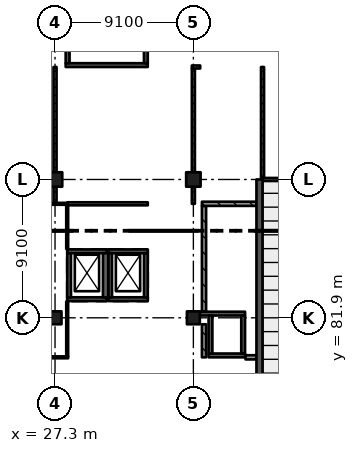
"""IFC4 building model, lengths in metres.
Left out: names, types, materials, properties, quantities, classifications, styles, units other than length and angle.
Written with IfcOpenShell. Run it as: python <this file> out.ifc"""

import sys

from ifc_helpers import new_model, si_unit, direction, frame, frame_2d, origin, origin_2d, place, context, subcontext, project, spatial, rectangle, extrude, element, fill, save


model = new_model("IFC4")
c1 = context("Model", 3, precision=1e-05, world=origin(), true_north=direction((0.0, 1.0)))
c2 = subcontext(c1, "Body", "Model", "MODEL_VIEW")
j1 = project(units=[si_unit("LENGTHUNIT", "METRE"), si_unit("PLANEANGLEUNIT", "RADIAN")], contexts=[c1])
p1 = place(None, origin())
s1 = spatial("IfcSite", under=j1, at=p1, CompositionType="ELEMENT")
p2 = place(p1, origin())
s2 = spatial("IfcBuilding", under=s1, at=p2, CompositionType="ELEMENT")
p3 = place(p2, origin())
s3 = spatial("IfcBuildingStorey", under=s2, at=p3, CompositionType="ELEMENT", Elevation=0.0)
p4 = place(p3, frame((27.3, 81.9, -0.4), z_axis=(0.0, 0.0, 1.0), x_axis=(1.0, 0.0, 0.0)))
e1 = element("IfcColumn", 1, at=p4, inside=s3, PredefinedType="COLUMN", context=c2, shape_type="SweptSolid", body=[
    extrude(rectangle(XDim=0.85, YDim=0.85, at=origin_2d()), origin(), (0.0, 0.0, 1.0), 6.77),
])
p5 = place(p3, frame((27.3, 91.0, -0.4), z_axis=(0.0, 0.0, 1.0), x_axis=(1.0, 0.0, 0.0)))
e2 = element("IfcColumn", 2, at=p5, inside=s3, PredefinedType="COLUMN", context=c2, shape_type="SweptSolid", body=[
    extrude(rectangle(XDim=0.95, YDim=0.95, at=origin_2d()), origin(), (0.0, 0.0, 1.0), 6.77),
])
p6 = place(p3, frame((36.4, 81.9, -0.4), z_axis=(0.0, 0.0, 1.0), x_axis=(1.0, 0.0, 0.0)))
e3 = element("IfcColumn", 3, at=p6, inside=s3, PredefinedType="COLUMN", context=c2, shape_type="SweptSolid", body=[
    extrude(rectangle(XDim=0.85, YDim=0.85, at=origin_2d()), origin(), (0.0, 0.0, 1.0), 6.77),
])
p7 = place(p3, frame((36.4, 91.0, -0.4), z_axis=(0.0, 0.0, 1.0), x_axis=(1.0, 0.0, 0.0)))
e4 = element("IfcColumn", 4, at=p7, inside=s3, PredefinedType="COLUMN", context=c2, shape_type="SweptSolid", body=[
    extrude(rectangle(XDim=0.95, YDim=0.95, at=origin_2d()), origin(), (0.0, 0.0, 1.0), 6.77),
])
p8 = place(p3, frame((40.75, 72.8, -0.4), z_axis=(0.0, 0.0, 1.0), x_axis=(0.0, 1.0, 0.0)))
e5 = element("IfcWall", 5, at=p8, inside=s3, PredefinedType="SHEAR", context=c2, shape_type="SweptSolid", body=[
    extrude(rectangle(XDim=18.2, YDim=0.4, at=frame_2d((9.1, 0.0))), origin(), (0.0, 0.0, 1.0), 6.77),
])
p9 = place(p3, frame((30.7, 83.125, -1.4), z_axis=(0.0, 0.0, 1.0), x_axis=(-1.0, 0.0, 0.0)))
e6 = element("IfcWall", 6, at=p9, inside=s3, PredefinedType="SHEAR", context=c2, shape_type="SweptSolid", body=[
    extrude(rectangle(XDim=2.6, YDim=0.25, at=frame_2d((1.3, 0.0))), origin(), (0.0, 0.0, 1.0), 7.77),
])
p10 = place(p3, frame((30.7, 86.275, -1.4), z_axis=(0.0, 0.0, 1.0), x_axis=(-1.0, 0.0, 0.0)))
e7 = element("IfcWall", 7, at=p10, inside=s3, PredefinedType="SHEAR", context=c2, shape_type="SweptSolid", body=[
    extrude(rectangle(XDim=2.6, YDim=0.25, at=frame_2d((1.3, 0.0))), origin(), (0.0, 0.0, 1.0), 7.77),
])
p11 = place(p10, frame((0.8, 0.0, 1.4)))
e8 = element("IfcOpeningElement", 8, at=p11, cuts=e7, PredefinedType="OPENING", context=c2, shape_type="SweptSolid", body=[
    extrude(rectangle(XDim=1.0, YDim=2.1, at=frame_2d((0.5, 1.05))), frame((0.0, 0.135, 0.0), z_axis=(0.0, -1.0, 0.0), x_axis=(1.0, 0.0, 0.0)), (0.0, 0.0, 1.0), 0.27),
])
p12 = place(p3, frame((28.225, 86.15, -1.4), z_axis=(0.0, 0.0, 1.0), x_axis=(0.0, -1.0, 0.0)))
e9 = element("IfcWall", 9, at=p12, inside=s3, PredefinedType="SHEAR", context=c2, shape_type="SweptSolid", body=[
    extrude(rectangle(XDim=2.9, YDim=0.25, at=frame_2d((1.45, 0.0))), origin(), (0.0, 0.0, 1.0), 7.77),
])
p13 = place(p3, frame((30.625, 86.15, -1.4), z_axis=(0.0, 0.0, 1.0), x_axis=(0.0, -1.0, 0.0)))
e10 = element("IfcWall", 10, at=p13, inside=s3, PredefinedType="SHEAR", context=c2, shape_type="SweptSolid", body=[
    extrude(rectangle(XDim=2.9, YDim=0.35, at=frame_2d((1.45, 0.0))), origin(), (0.0, 0.0, 1.0), 7.77),
])
p14 = place(p3, frame((33.4, 83.125, -1.4), z_axis=(0.0, 0.0, 1.0), x_axis=(-1.0, 0.0, 0.0)))
e11 = element("IfcWall", 11, at=p14, inside=s3, PredefinedType="SHEAR", context=c2, shape_type="SweptSolid", body=[
    extrude(rectangle(XDim=2.6, YDim=0.25, at=frame_2d((1.3, 0.0))), origin(), (0.0, 0.0, 1.0), 7.77),
])
p15 = place(p3, frame((33.4, 86.275, -1.4), z_axis=(0.0, 0.0, 1.0), x_axis=(-1.0, 0.0, 0.0)))
e12 = element("IfcWall", 12, at=p15, inside=s3, PredefinedType="SHEAR", context=c2, shape_type="SweptSolid", body=[
    extrude(rectangle(XDim=2.6, YDim=0.25, at=frame_2d((1.3, 0.0))), origin(), (0.0, 0.0, 1.0), 7.77),
])
p16 = place(p15, frame((0.8, 0.0, 1.4)))
e13 = element("IfcOpeningElement", 13, at=p16, cuts=e12, PredefinedType="OPENING", context=c2, shape_type="SweptSolid", body=[
    extrude(rectangle(XDim=1.0, YDim=2.1, at=frame_2d((0.5, 1.05))), frame((0.0, 0.135, 0.0), z_axis=(0.0, -1.0, 0.0), x_axis=(1.0, 0.0, 0.0)), (0.0, 0.0, 1.0), 0.27),
])
for number, where, z_axis, x_axis in (
    (14, (30.925, 86.15, -1.4), (0.0, 0.0, 1.0), (0.0, -1.0, 0.0)),
    (15, (33.275, 86.15, -1.4), (0.0, 0.0, 1.0), (0.0, -1.0, 0.0)),
):
    element("IfcWall", number, at=place(p3, frame(where, z_axis=z_axis, x_axis=x_axis)), inside=s3, PredefinedType="SHEAR", context=c2, shape_type="SweptSolid", body=[
        extrude(rectangle(XDim=2.9, YDim=0.25, at=frame_2d((1.45, 0.0))), origin(), (0.0, 0.0, 1.0), 7.77),
    ])
p17 = place(p3, frame((39.8, 79.425, -0.4), z_axis=(0.0, 0.0, 1.0), x_axis=(-1.0, 0.0, 0.0)))
e16 = element("IfcWall", 16, at=p17, inside=s3, PredefinedType="SHEAR", context=c2, shape_type="SweptSolid", body=[
    extrude(rectangle(XDim=2.4, YDim=0.25, at=frame_2d((1.2, 0.0))), origin(), (0.0, 0.0, 1.0), 6.77),
])
p18 = place(p17, frame((0.75, 0.0, 0.4)))
e17 = element("IfcOpeningElement", 17, at=p18, cuts=e16, PredefinedType="OPENING", context=c2, shape_type="SweptSolid", body=[
    extrude(rectangle(XDim=0.9, YDim=2.1, at=frame_2d((0.45, 1.05))), frame((0.0, 0.135, 0.0), z_axis=(0.0, -1.0, 0.0), x_axis=(1.0, 0.0, 0.0)), (0.0, 0.0, 1.0), 0.27),
])
p19 = place(p3, frame((39.8, 82.175, -0.4), z_axis=(0.0, 0.0, 1.0), x_axis=(-1.0, 0.0, 0.0)))
e18 = element("IfcWall", 18, at=p19, inside=s3, PredefinedType="SHEAR", context=c2, shape_type="SweptSolid", body=[
    extrude(rectangle(XDim=2.975, YDim=0.25, at=frame_2d((1.488, 0.0))), origin(), (0.0, 0.0, 1.0), 6.77),
])
for number, where, z_axis, x_axis in (
    (19, (37.525, 82.05, -0.4), (0.0, 0.0, 1.0), (0.0, -1.0, 0.0)),
    (20, (39.675, 82.05, -0.4), (0.0, 0.0, 1.0), (0.0, -1.0, 0.0)),
):
    element("IfcWall", number, at=place(p3, frame(where, z_axis=z_axis, x_axis=x_axis)), inside=s3, PredefinedType="SHEAR", context=c2, shape_type="SweptSolid", body=[
        extrude(rectangle(XDim=2.5, YDim=0.25, at=frame_2d((1.25, 0.0))), origin(), (0.0, 0.0, 1.0), 6.77),
    ])
p20 = place(p3, frame((33.4, 98.525, -0.4), z_axis=(0.0, 0.0, 1.0), x_axis=(-1.0, 0.0, 0.0)))
e21 = element("IfcWall", 21, at=p20, inside=s3, PredefinedType="SHEAR", context=c2, shape_type="SweptSolid", body=[
    extrude(rectangle(XDim=5.4, YDim=0.25, at=frame_2d((2.7, 0.0))), origin(), (0.0, 0.0, 1.0), 6.77),
])
p21 = place(p20, frame((1.5, 0.0, 0.4)))
e22 = element("IfcOpeningElement", 22, at=p21, cuts=e21, PredefinedType="OPENING", context=c2, shape_type="SweptSolid", body=[
    extrude(rectangle(XDim=2.4, YDim=2.1, at=frame_2d((1.2, 1.05))), frame((0.0, 0.135, 0.0), z_axis=(0.0, -1.0, 0.0), x_axis=(1.0, 0.0, 0.0)), (0.0, 0.0, 1.0), 0.27),
])
p22 = place(p3, frame((28.125, 108.25, -0.4), z_axis=(0.0, 0.0, 1.0), x_axis=(0.0, -1.0, 0.0)))
e23 = element("IfcWall", 23, at=p22, inside=s3, PredefinedType="SHEAR", context=c2, shape_type="SweptSolid", body=[
    extrude(rectangle(XDim=9.6, YDim=0.25, at=frame_2d((4.8, 0.0))), origin(), (0.0, 0.0, 1.0), 6.77),
])
p23 = place(p3, frame((33.275, 108.25, -0.4), z_axis=(0.0, 0.0, 1.0), x_axis=(0.0, -1.0, 0.0)))
e24 = element("IfcWall", 24, at=p23, inside=s3, PredefinedType="SHEAR", context=c2, shape_type="SweptSolid", body=[
    extrude(rectangle(XDim=9.6, YDim=0.25, at=frame_2d((4.8, 0.0))), origin(), (0.0, 0.0, 1.0), 6.77),
])
p24 = place(p23, frame((7.95, 0.0, 0.4)))
e25 = element("IfcOpeningElement", 25, at=p24, cuts=e24, PredefinedType="OPENING", context=c2, shape_type="SweptSolid", body=[
    extrude(rectangle(XDim=1.2, YDim=2.1, at=frame_2d((0.6, 1.05))), frame((0.0, 0.135, 0.0), z_axis=(0.0, -1.0, 0.0), x_axis=(1.0, 0.0, 0.0)), (0.0, 0.0, 1.0), 0.27),
])
p25 = place(p3, frame((24.3, 89.4, 0.0), z_axis=(0.0, 0.0, 1.0), x_axis=(1.0, 0.0, 0.0)))
e26 = element("IfcWall", 26, at=p25, inside=s3, PredefinedType="PARTITIONING", context=c2, shape_type="SweptSolid", body=[
    extrude(rectangle(XDim=3.8, YDim=0.125, at=frame_2d((1.9, 0.0))), origin(), (0.0, 0.0, 1.0), 6.02),
])
p26 = place(p25, frame((1.05, 0.0, 0.0)))
e27 = element("IfcOpeningElement", 27, at=p26, cuts=e26, PredefinedType="OPENING", context=c2, shape_type="SweptSolid", body=[
    extrude(rectangle(XDim=0.9, YDim=2.1, at=frame_2d((0.45, 1.05))), frame((0.0, 0.073, 0.0), z_axis=(0.0, -1.0, 0.0), x_axis=(1.0, 0.0, 0.0)), (0.0, 0.0, 1.0), 0.145),
])
p27 = place(p3, frame((27.3, 90.525, 0.0), z_axis=(0.0, 0.0, 1.0), x_axis=(0.0, -1.0, 0.0)))
e28 = element("IfcWall", 28, at=p27, inside=s3, PredefinedType="PARTITIONING", context=c2, shape_type="SweptSolid", body=[
    extrude(rectangle(XDim=1.062, YDim=0.2, at=frame_2d((0.531, 0.0))), origin(), (0.0, 0.0, 1.0), 5.32),
])
p28 = place(p3, frame((27.3, 98.4, 0.0), z_axis=(0.0, 0.0, 1.0), x_axis=(0.0, -1.0, 0.0)))
e29 = element("IfcWall", 29, at=p28, inside=s3, PredefinedType="PARTITIONING", context=c2, shape_type="SweptSolid", body=[
    extrude(rectangle(XDim=6.925, YDim=0.2, at=frame_2d((3.462, 0.0))), origin(), (0.0, 0.0, 1.0), 5.32),
])
p29 = place(p28, frame((0.85, 0.0, 0.0)))
e30 = element("IfcOpeningElement", 30, at=p29, cuts=e29, PredefinedType="OPENING", context=c2, shape_type="SweptSolid", body=[
    extrude(rectangle(XDim=1.8, YDim=2.4, at=frame_2d((0.9, 1.2))), frame((0.0, 0.11, 0.0), z_axis=(0.0, -1.0, 0.0), x_axis=(1.0, 0.0, 0.0)), (0.0, 0.0, 1.0), 0.22),
])
p30 = place(p28, frame((4.25, 0.0, 0.0)))
e31 = element("IfcOpeningElement", 31, at=p30, cuts=e29, PredefinedType="OPENING", context=c2, shape_type="SweptSolid", body=[
    extrude(rectangle(XDim=1.8, YDim=2.4, at=frame_2d((0.9, 1.2))), frame((0.0, 0.11, 0.0), z_axis=(0.0, -1.0, 0.0), x_axis=(1.0, 0.0, 0.0)), (0.0, 0.0, 1.0), 0.22),
])
p31 = place(p3, frame((28.1, 82.97, 0.0), z_axis=(0.0, 0.0, 1.0), x_axis=(0.0, -1.0, 0.0)))
e32 = element("IfcWall", 32, at=p31, inside=s3, PredefinedType="PARTITIONING", context=c2, shape_type="SweptSolid", body=[
    extrude(rectangle(XDim=3.607, YDim=0.125, at=frame_2d((1.804, 0.0))), origin(), (0.0, 0.0, 1.0), 6.02),
])
p32 = place(p3, frame((28.1, 89.3, 0.0), z_axis=(0.0, 0.0, 1.0), x_axis=(0.0, -1.0, 0.0)))
e33 = element("IfcWall", 33, at=p32, inside=s3, PredefinedType="PARTITIONING", context=c2, shape_type="SweptSolid", body=[
    extrude(rectangle(XDim=2.87, YDim=0.125, at=frame_2d((1.435, 0.0))), origin(), (0.0, 0.0, 1.0), 6.02),
])
p33 = place(p3, frame((28.163, 79.3, 0.0), z_axis=(0.0, 0.0, 1.0), x_axis=(-1.0, 0.0, 0.0)))
e34 = element("IfcWall", 34, at=p33, inside=s3, PredefinedType="PARTITIONING", context=c2, shape_type="SweptSolid", body=[
    extrude(rectangle(XDim=1.433, YDim=0.125, at=frame_2d((0.716, 0.0))), origin(), (0.0, 0.0, 1.0), 6.02),
])
p34 = place(p3, frame((33.4, 89.4, 0.0), z_axis=(0.0, 0.0, 1.0), x_axis=(-1.0, 0.0, 0.0)))
e35 = element("IfcWall", 35, at=p34, inside=s3, PredefinedType="PARTITIONING", context=c2, shape_type="SweptSolid", body=[
    extrude(rectangle(XDim=5.3, YDim=0.2, at=frame_2d((2.65, 0.0))), origin(), (0.0, 0.0, 1.0), 6.02),
])
p35 = place(p34, frame((1.75, 0.0, 0.0)))
e36 = element("IfcOpeningElement", 36, at=p35, cuts=e35, PredefinedType="OPENING", context=c2, shape_type="SweptSolid", body=[
    extrude(rectangle(XDim=1.8, YDim=2.4, at=frame_2d((0.9, 1.2))), frame((0.0, 0.11, 0.0), z_axis=(0.0, -1.0, 0.0), x_axis=(1.0, 0.0, 0.0)), (0.0, 0.0, 1.0), 0.22),
])
p36 = place(p3, frame((36.4, 90.525, 0.0), z_axis=(0.0, 0.0, 1.0), x_axis=(0.0, -1.0, 0.0)))
e37 = element("IfcWall", 37, at=p36, inside=s3, PredefinedType="PARTITIONING", context=c2, shape_type="SweptSolid", body=[
    extrude(rectangle(XDim=1.125, YDim=0.2, at=frame_2d((0.562, 0.0))), origin(), (0.0, 0.0, 1.0), 5.32),
])
p37 = place(p3, frame((36.4, 98.3, 0.0), z_axis=(0.0, 0.0, 1.0), x_axis=(0.0, -1.0, 0.0)))
e38 = element("IfcWall", 38, at=p37, inside=s3, PredefinedType="PARTITIONING", context=c2, shape_type="SweptSolid", body=[
    extrude(rectangle(XDim=6.825, YDim=0.2, at=frame_2d((3.413, 0.0))), origin(), (0.0, 0.0, 1.0), 5.32),
])
p38 = place(p37, frame((0.85, 0.0, 0.0)))
e39 = element("IfcOpeningElement", 39, at=p38, cuts=e38, PredefinedType="OPENING", context=c2, shape_type="SweptSolid", body=[
    extrude(rectangle(XDim=1.8, YDim=2.4, at=frame_2d((0.9, 1.2))), frame((0.0, 0.11, 0.0), z_axis=(0.0, -1.0, 0.0), x_axis=(1.0, 0.0, 0.0)), (0.0, 0.0, 1.0), 0.22),
])
p39 = place(p37, frame((4.25, 0.0, 0.0)))
e40 = element("IfcOpeningElement", 40, at=p39, cuts=e38, PredefinedType="OPENING", context=c2, shape_type="SweptSolid", body=[
    extrude(rectangle(XDim=1.8, YDim=2.4, at=frame_2d((0.9, 1.2))), frame((0.0, 0.11, 0.0), z_axis=(0.0, -1.0, 0.0), x_axis=(1.0, 0.0, 0.0)), (0.0, 0.0, 1.0), 0.22),
])
p40 = place(p3, frame((36.85, 98.4, 0.0), z_axis=(0.0, 0.0, 1.0), x_axis=(-1.0, 0.0, 0.0)))
e41 = element("IfcWall", 41, at=p40, inside=s3, PredefinedType="PARTITIONING", context=c2, shape_type="SweptSolid", body=[
    extrude(rectangle(XDim=0.55, YDim=0.2, at=frame_2d((0.275, 0.0))), origin(), (0.0, 0.0, 1.0), 6.02),
])
p41 = place(p3, frame((37.1, 81.475, 0.0), z_axis=(0.0, 0.0, 1.0), x_axis=(0.0, -1.0, 0.0)))
e42 = element("IfcWall", 42, at=p41, inside=s3, PredefinedType="SOLIDWALL", context=c2, shape_type="SweptSolid", body=[
    extrude(rectangle(XDim=2.175, YDim=0.275, at=frame_2d((1.087, 0.0))), origin(), (0.0, 0.0, 1.0), 6.02),
])
p42 = place(p3, frame((37.1, 89.262, 0.0), z_axis=(0.0, 0.0, 1.0), x_axis=(0.0, -1.0, 0.0)))
e43 = element("IfcWall", 43, at=p42, inside=s3, PredefinedType="SOLIDWALL", context=c2, shape_type="SweptSolid", body=[
    extrude(rectangle(XDim=6.938, YDim=0.275, at=frame_2d((3.469, 0.0))), origin(), (0.0, 0.0, 1.0), 6.02),
])
p43 = place(p3, frame((40.55, 79.3, 0.0), z_axis=(0.0, 0.0, 1.0), x_axis=(-1.0, 0.0, 0.0)))
e44 = element("IfcWall", 44, at=p43, inside=s3, PredefinedType="SOLIDWALL", context=c2, shape_type="SweptSolid", body=[
    extrude(rectangle(XDim=0.72, YDim=0.275, at=frame_2d((0.36, 0.0))), origin(), (0.0, 0.0, 1.0), 6.02),
])
p44 = place(p3, frame((40.55, 89.4, 0.0), z_axis=(0.0, 0.0, 1.0), x_axis=(-1.0, 0.0, 0.0)))
e45 = element("IfcWall", 45, at=p44, inside=s3, PredefinedType="SOLIDWALL", context=c2, shape_type="SweptSolid", body=[
    extrude(rectangle(XDim=3.588, YDim=0.275, at=frame_2d((1.794, 0.0))), origin(), (0.0, 0.0, 1.0), 6.02),
])
p45 = place(p44, frame((1.15, 0.0, 0.0)))
e46 = element("IfcOpeningElement", 46, at=p45, cuts=e45, PredefinedType="OPENING", context=c2, shape_type="SweptSolid", body=[
    extrude(rectangle(XDim=1.2, YDim=2.4, at=frame_2d((0.6, 1.2))), frame((0.0, 0.147, 0.0), z_axis=(0.0, -1.0, 0.0), x_axis=(1.0, 0.0, 0.0)), (0.0, 0.0, 1.0), 0.295),
])
p46 = place(p3, frame((40.95, 98.4, 0.0), z_axis=(0.0, 0.0, 1.0), x_axis=(0.0, -1.0, 0.0)))
e47 = element("IfcWall", 47, at=p46, inside=s3, PredefinedType="PARTITIONING", context=c2, shape_type="SweptSolid", body=[
    extrude(rectangle(XDim=7.3, YDim=0.2, at=frame_2d((3.65, 0.0))), origin(), (0.0, 0.0, 1.0), 6.02),
])
p47 = place(p46, frame((0.95, 0.0, 0.0)))
e48 = element("IfcOpeningElement", 48, at=p47, cuts=e47, PredefinedType="OPENING", context=c2, shape_type="SweptSolid", body=[
    extrude(rectangle(XDim=1.8, YDim=2.4, at=frame_2d((0.9, 1.2))), frame((0.0, 0.11, 0.0), z_axis=(0.0, -1.0, 0.0), x_axis=(1.0, 0.0, 0.0)), (0.0, 0.0, 1.0), 0.22),
])
p48 = place(p46, frame((4.55, 0.0, 0.0)))
e49 = element("IfcOpeningElement", 49, at=p48, cuts=e47, PredefinedType="OPENING", context=c2, shape_type="SweptSolid", body=[
    extrude(rectangle(XDim=1.8, YDim=2.4, at=frame_2d((0.9, 1.2))), frame((0.0, 0.11, 0.0), z_axis=(0.0, -1.0, 0.0), x_axis=(1.0, 0.0, 0.0)), (0.0, 0.0, 1.0), 0.22),
])
p49 = place(p3, frame((45.2, 91.0, 0.0), z_axis=(0.0, 0.0, 1.0), x_axis=(-1.0, 0.0, 0.0)))
e50 = element("IfcWall", 50, at=p49, inside=s3, PredefinedType="PARTITIONING", context=c2, shape_type="SweptSolid", body=[
    extrude(rectangle(XDim=4.35, YDim=0.2, at=frame_2d((2.175, 0.0))), origin(), (0.0, 0.0, 1.0), 5.02),
])
p50 = place(p45, origin())
e51 = element("IfcDoor", 51, at=p50, inside=s3, OperationType="SINGLE_SWING_RIGHT", PredefinedType="DOOR", context=c2, shape_type="SweptSolid", body=[
    extrude(rectangle(XDim=1.2, YDim=2.4, at=frame_2d((0.6, 1.2))), frame((0.0, 0.025, 0.0), z_axis=(0.0, -1.0, 0.0), x_axis=(1.0, 0.0, 0.0)), (0.0, 0.0, 1.0), 0.05),
])
fill(e46, e51)
p51 = place(p29, origin())
e52 = element("IfcDoor", 52, at=p51, inside=s3, OperationType="DOUBLE_DOOR_SINGLE_SWING", PredefinedType="DOOR", context=c2, shape_type="SweptSolid", body=[
    extrude(rectangle(XDim=1.8, YDim=2.4, at=frame_2d((0.9, 1.2))), frame((0.0, 0.025, 0.0), z_axis=(0.0, -1.0, 0.0), x_axis=(1.0, 0.0, 0.0)), (0.0, 0.0, 1.0), 0.05),
])
fill(e30, e52)
p52 = place(p30, origin())
e53 = element("IfcDoor", 53, at=p52, inside=s3, OperationType="DOUBLE_DOOR_SINGLE_SWING", PredefinedType="DOOR", context=c2, shape_type="SweptSolid", body=[
    extrude(rectangle(XDim=1.8, YDim=2.4, at=frame_2d((0.9, 1.2))), frame((0.0, 0.025, 0.0), z_axis=(0.0, -1.0, 0.0), x_axis=(1.0, 0.0, 0.0)), (0.0, 0.0, 1.0), 0.05),
])
fill(e31, e53)
p53 = place(p38, origin())
e54 = element("IfcDoor", 54, at=p53, inside=s3, OperationType="DOUBLE_DOOR_SINGLE_SWING", PredefinedType="DOOR", context=c2, shape_type="SweptSolid", body=[
    extrude(rectangle(XDim=1.8, YDim=2.4, at=frame_2d((0.9, 1.2))), frame((0.0, 0.025, 0.0), z_axis=(0.0, -1.0, 0.0), x_axis=(1.0, 0.0, 0.0)), (0.0, 0.0, 1.0), 0.05),
])
fill(e39, e54)
p54 = place(p39, origin())
e55 = element("IfcDoor", 55, at=p54, inside=s3, OperationType="DOUBLE_DOOR_SINGLE_SWING", PredefinedType="DOOR", context=c2, shape_type="SweptSolid", body=[
    extrude(rectangle(XDim=1.8, YDim=2.4, at=frame_2d((0.9, 1.2))), frame((0.0, 0.025, 0.0), z_axis=(0.0, -1.0, 0.0), x_axis=(1.0, 0.0, 0.0)), (0.0, 0.0, 1.0), 0.05),
])
fill(e40, e55)
p55 = place(p35, origin())
e56 = element("IfcDoor", 56, at=p55, inside=s3, OperationType="DOUBLE_DOOR_SINGLE_SWING", PredefinedType="DOOR", context=c2, shape_type="SweptSolid", body=[
    extrude(rectangle(XDim=1.8, YDim=2.4, at=frame_2d((0.9, 1.2))), frame((0.0, 0.025, 0.0), z_axis=(0.0, -1.0, 0.0), x_axis=(1.0, 0.0, 0.0)), (0.0, 0.0, 1.0), 0.05),
])
fill(e36, e56)
p56 = place(p47, origin())
e57 = element("IfcDoor", 57, at=p56, inside=s3, OperationType="DOUBLE_DOOR_SINGLE_SWING", PredefinedType="DOOR", context=c2, shape_type="SweptSolid", body=[
    extrude(rectangle(XDim=1.8, YDim=2.4, at=frame_2d((0.9, 1.2))), frame((0.0, 0.025, 0.0), z_axis=(0.0, -1.0, 0.0), x_axis=(1.0, 0.0, 0.0)), (0.0, 0.0, 1.0), 0.05),
])
fill(e48, e57)
p57 = place(p48, origin())
e58 = element("IfcDoor", 58, at=p57, inside=s3, OperationType="DOUBLE_DOOR_SINGLE_SWING", PredefinedType="DOOR", context=c2, shape_type="SweptSolid", body=[
    extrude(rectangle(XDim=1.8, YDim=2.4, at=frame_2d((0.9, 1.2))), frame((0.0, 0.025, 0.0), z_axis=(0.0, -1.0, 0.0), x_axis=(1.0, 0.0, 0.0)), (0.0, 0.0, 1.0), 0.05),
])
fill(e49, e58)
p58 = place(p18, origin())
e59 = element("IfcDoor", 59, at=p58, inside=s3, OperationType="SINGLE_SWING_RIGHT", PredefinedType="DOOR", context=c2, shape_type="SweptSolid", body=[
    extrude(rectangle(XDim=0.9, YDim=2.1, at=frame_2d((0.45, 1.05))), frame((0.0, 0.025, 0.0), z_axis=(0.0, -1.0, 0.0), x_axis=(1.0, 0.0, 0.0)), (0.0, 0.0, 1.0), 0.05),
])
fill(e17, e59)
p59 = place(p21, origin())
e60 = element("IfcDoor", 60, at=p59, inside=s3, OperationType="DOUBLE_DOOR_SINGLE_SWING", PredefinedType="DOOR", context=c2, shape_type="SweptSolid", body=[
    extrude(rectangle(XDim=2.4, YDim=2.1, at=frame_2d((1.2, 1.05))), frame((0.0, 0.025, 0.0), z_axis=(0.0, -1.0, 0.0), x_axis=(1.0, 0.0, 0.0)), (0.0, 0.0, 1.0), 0.05),
])
fill(e22, e60)
p60 = place(p24, origin())
e61 = element("IfcDoor", 61, at=p60, inside=s3, OperationType="SINGLE_SWING_LEFT", PredefinedType="DOOR", context=c2, shape_type="SweptSolid", body=[
    extrude(rectangle(XDim=1.2, YDim=2.1, at=frame_2d((0.6, 1.05))), frame((0.0, 0.025, 0.0), z_axis=(0.0, -1.0, 0.0), x_axis=(1.0, 0.0, 0.0)), (0.0, 0.0, 1.0), 0.05),
])
fill(e25, e61)
p61 = place(p11, origin())
e62 = element("IfcDoor", 62, at=p61, inside=s3, OperationType="DOUBLE_DOOR_SLIDING", PredefinedType="DOOR", context=c2, shape_type="SweptSolid", body=[
    extrude(rectangle(XDim=1.0, YDim=2.1, at=frame_2d((0.5, 1.05))), frame((0.0, 0.025, 0.0), z_axis=(0.0, -1.0, 0.0), x_axis=(1.0, 0.0, 0.0)), (0.0, 0.0, 1.0), 0.05),
])
fill(e8, e62)
p62 = place(p16, origin())
e63 = element("IfcDoor", 63, at=p62, inside=s3, OperationType="DOUBLE_DOOR_SLIDING", PredefinedType="DOOR", context=c2, shape_type="SweptSolid", body=[
    extrude(rectangle(XDim=1.0, YDim=2.1, at=frame_2d((0.5, 1.05))), frame((0.0, 0.025, 0.0), z_axis=(0.0, -1.0, 0.0), x_axis=(1.0, 0.0, 0.0)), (0.0, 0.0, 1.0), 0.05),
])
fill(e13, e63)
save(model, sys.argv[1])
